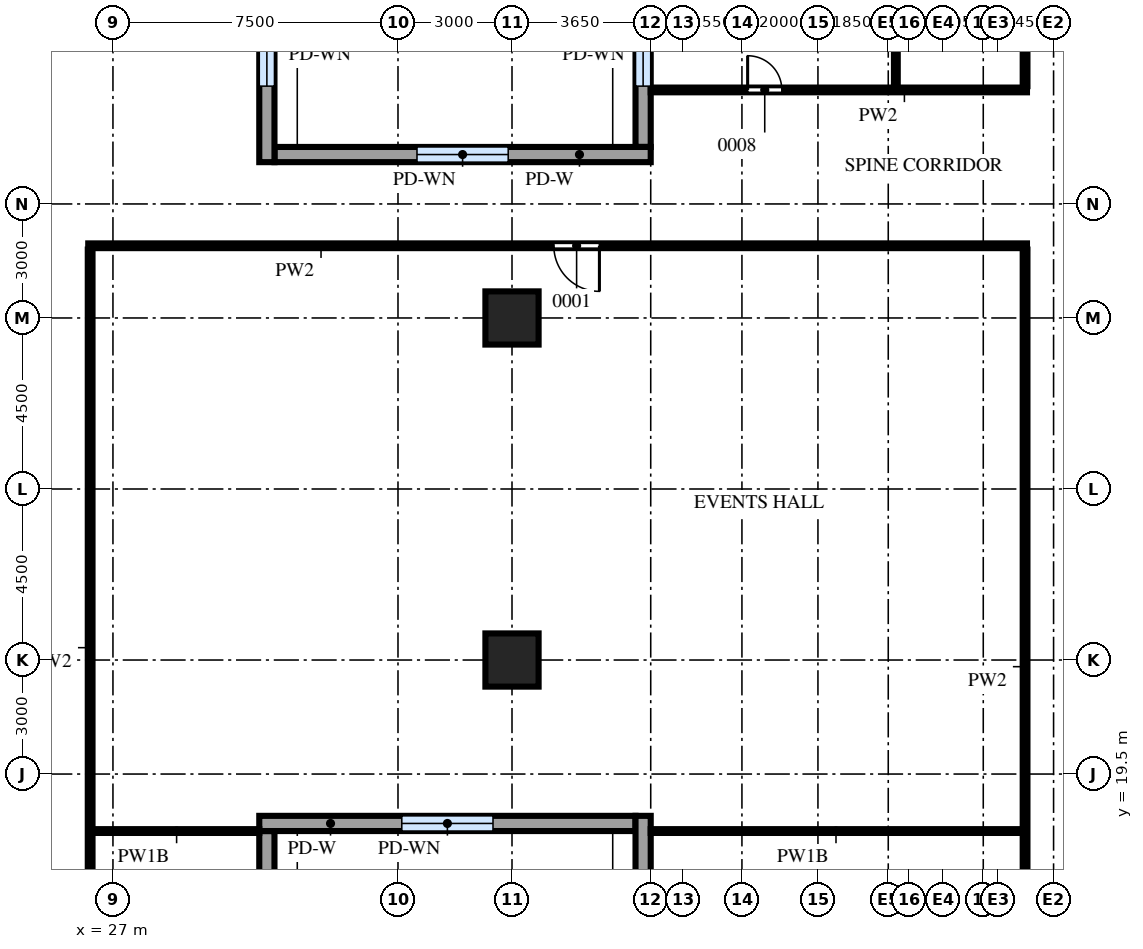
"""IFC4 building model, lengths in metres.
Left out: names, types, materials, properties, quantities, classifications, styles, units other than length and angle.
Written with IfcOpenShell. Run it as: python <this file> out.ifc"""

import sys

from ifc_helpers import new_model, si_unit, direction, frame, frame_2d, origin, origin_2d, place, context, subcontext, project, spatial, rectangle, extrude, source, transform, mapped, element, fill, save


model = new_model("IFC4")
c1 = context("Model", 3, precision=1e-05, world=origin(), true_north=direction((0.0, 1.0)))
c2 = subcontext(c1, "Body", "Model", "MODEL_VIEW")
j1 = project(units=[si_unit("LENGTHUNIT", "METRE"), si_unit("PLANEANGLEUNIT", "RADIAN")], contexts=[c1])
p1 = place(None, origin())
s1 = spatial("IfcSite", under=j1, at=p1, CompositionType="ELEMENT")
p2 = place(p1, origin())
s2 = spatial("IfcBuilding", under=s1, at=p2, CompositionType="ELEMENT")
p3 = place(p2, frame((0.0, 0.0, 23.5)))
s3 = spatial("IfcBuildingStorey", under=s2, at=p3, CompositionType="ELEMENT", Elevation=23.5)
m1 = source(origin(), c2, "Body", "SweptSolid", [
    extrude(rectangle(XDim=1.4, YDim=1.4, at=origin_2d()), origin(), (0.0, 0.0, 1.0), 4.7),
])
for number, where, z_axis, x_axis in (
    (1, (37.5, 22.5, 0.0), (0.0, 0.0, 1.0), (1.0, 0.0, 0.0)),
    (2, (37.5, 31.5, 0.0), (0.0, 0.0, 1.0), (1.0, 0.0, 0.0)),
):
    element("IfcColumn", number, at=place(p3, frame(where, z_axis=z_axis, x_axis=x_axis)), inside=s3, PredefinedType="COLUMN", context=c2, shape_type="MappedRepresentation", body=[
        mapped(m1, transform((0.0, 0.0, 0.0))),
    ])
m2 = source(origin(), c2, "Body", "SweptSolid", [
    extrude(rectangle(XDim=17.6, YDim=0.4, at=frame_2d((8.8, 0.0))), origin(), (0.0, 0.0, 1.0), 4.7),
])
p4 = place(p3, frame((31.05, 0.4, 0.0), z_axis=(0.0, 0.0, 1.0), x_axis=(0.0, 1.0, 0.0)))
e3 = element("IfcWall", 3, at=p4, inside=s3, PredefinedType="SOLIDWALL", context=c2, shape_type="MappedRepresentation", body=[
    mapped(m2, transform((0.0, 0.0, 0.0))),
])
m3 = source(origin(), c2, "Body", "SweptSolid", [
    extrude(rectangle(XDim=2.4, YDim=2.4, at=frame_2d((1.2, 1.2))), frame((0.0, 0.21, 0.0), z_axis=(0.0, -1.0, 0.0), x_axis=(1.0, 0.0, 0.0)), (0.0, 0.0, 1.0), 0.42),
])
p5 = place(p4, frame((1.6, 0.0, 1.0)))
e4 = element("IfcOpeningElement", 4, at=p5, cuts=e3, PredefinedType="OPENING", context=c2, shape_type="MappedRepresentation", body=[
    mapped(m3, transform((0.0, 0.0, 0.0))),
])
p6 = place(p4, frame((7.6, 0.0, 1.0)))
e5 = element("IfcOpeningElement", 5, at=p6, cuts=e3, PredefinedType="OPENING", context=c2, shape_type="MappedRepresentation", body=[
    mapped(m3, transform((0.0, 0.0, 0.0))),
])
p7 = place(p4, frame((13.6, 0.0, 1.0)))
e6 = element("IfcOpeningElement", 6, at=p7, cuts=e3, PredefinedType="OPENING", context=c2, shape_type="MappedRepresentation", body=[
    mapped(m3, transform((0.0, 0.0, 0.0))),
])
m4 = source(origin(), c2, "Body", "SweptSolid", [
    extrude(rectangle(XDim=9.9, YDim=0.4, at=frame_2d((4.95, 0.0))), origin(), (0.0, 0.0, 1.0), 4.7),
])
p8 = place(p3, frame((30.85, 18.2, 0.0), z_axis=(0.0, 0.0, 1.0), x_axis=(1.0, 0.0, 0.0)))
e7 = element("IfcWall", 7, at=p8, inside=s3, PredefinedType="SOLIDWALL", context=c2, shape_type="MappedRepresentation", body=[
    mapped(m4, transform((0.0, 0.0, 0.0))),
])
p9 = place(p8, frame((3.75, 0.0, 1.0)))
e8 = element("IfcOpeningElement", 8, at=p9, cuts=e7, PredefinedType="OPENING", context=c2, shape_type="MappedRepresentation", body=[
    mapped(m3, transform((0.0, 0.0, 0.0))),
])
m5 = source(origin(), c2, "Body", "SweptSolid", [
    extrude(rectangle(XDim=18.4, YDim=0.4, at=frame_2d((9.2, 0.0))), origin(), (0.0, 0.0, 1.0), 4.7),
])
p10 = place(p3, frame((40.95, 18.4, 0.0), z_axis=(0.0, 0.0, 1.0), x_axis=(0.0, -1.0, 0.0)))
e9 = element("IfcWall", 9, at=p10, inside=s3, PredefinedType="SOLIDWALL", context=c2, shape_type="MappedRepresentation", body=[
    mapped(m5, transform((0.0, 0.0, 0.0))),
])
p11 = place(p10, frame((2.0, 0.0, 1.0)))
e10 = element("IfcOpeningElement", 10, at=p11, cuts=e9, PredefinedType="OPENING", context=c2, shape_type="MappedRepresentation", body=[
    mapped(m3, transform((0.0, 0.0, 0.0))),
])
p12 = place(p10, frame((8.0, 0.0, 1.0)))
e11 = element("IfcOpeningElement", 11, at=p12, cuts=e9, PredefinedType="OPENING", context=c2, shape_type="MappedRepresentation", body=[
    mapped(m3, transform((0.0, 0.0, 0.0))),
])
p13 = place(p10, frame((14.0, 0.0, 1.0)))
e12 = element("IfcOpeningElement", 12, at=p13, cuts=e9, PredefinedType="OPENING", context=c2, shape_type="MappedRepresentation", body=[
    mapped(m3, transform((0.0, 0.0, 0.0))),
])
p14 = place(p3, frame((40.95, 53.6, 0.0), z_axis=(0.0, 0.0, 1.0), x_axis=(0.0, -1.0, 0.0)))
e13 = element("IfcWall", 13, at=p14, inside=s3, PredefinedType="SOLIDWALL", context=c2, shape_type="MappedRepresentation", body=[
    mapped(m2, transform((0.0, 0.0, 0.0))),
])
p15 = place(p14, frame((1.6, 0.0, 1.0)))
e14 = element("IfcOpeningElement", 14, at=p15, cuts=e13, PredefinedType="OPENING", context=c2, shape_type="MappedRepresentation", body=[
    mapped(m3, transform((0.0, 0.0, 0.0))),
])
p16 = place(p14, frame((7.6, 0.0, 1.0)))
e15 = element("IfcOpeningElement", 15, at=p16, cuts=e13, PredefinedType="OPENING", context=c2, shape_type="MappedRepresentation", body=[
    mapped(m3, transform((0.0, 0.0, 0.0))),
])
p17 = place(p14, frame((13.6, 0.0, 1.0)))
e16 = element("IfcOpeningElement", 16, at=p17, cuts=e13, PredefinedType="OPENING", context=c2, shape_type="MappedRepresentation", body=[
    mapped(m3, transform((0.0, 0.0, 0.0))),
])
p18 = place(p3, frame((41.15, 35.8, 0.0), z_axis=(0.0, 0.0, 1.0), x_axis=(-1.0, 0.0, 0.0)))
e17 = element("IfcWall", 17, at=p18, inside=s3, PredefinedType="SOLIDWALL", context=c2, shape_type="MappedRepresentation", body=[
    mapped(m4, transform((0.0, 0.0, 0.0))),
])
p19 = place(p18, frame((3.75, 0.0, 1.0)))
e18 = element("IfcOpeningElement", 18, at=p19, cuts=e17, PredefinedType="OPENING", context=c2, shape_type="MappedRepresentation", body=[
    mapped(m3, transform((0.0, 0.0, 0.0))),
])
p20 = place(p3, frame((31.05, 35.6, 0.0), z_axis=(0.0, 0.0, 1.0), x_axis=(0.0, 1.0, 0.0)))
e19 = element("IfcWall", 19, at=p20, inside=s3, PredefinedType="SOLIDWALL", context=c2, shape_type="MappedRepresentation", body=[
    mapped(m5, transform((0.0, 0.0, 0.0))),
])
p21 = place(p20, frame((2.0, 0.0, 1.0)))
e20 = element("IfcOpeningElement", 20, at=p21, cuts=e19, PredefinedType="OPENING", context=c2, shape_type="MappedRepresentation", body=[
    mapped(m3, transform((0.0, 0.0, 0.0))),
])
p22 = place(p20, frame((8.0, 0.0, 1.0)))
e21 = element("IfcOpeningElement", 21, at=p22, cuts=e19, PredefinedType="OPENING", context=c2, shape_type="MappedRepresentation", body=[
    mapped(m3, transform((0.0, 0.0, 0.0))),
])
p23 = place(p20, frame((14.0, 0.0, 1.0)))
e22 = element("IfcOpeningElement", 22, at=p23, cuts=e19, PredefinedType="OPENING", context=c2, shape_type="MappedRepresentation", body=[
    mapped(m3, transform((0.0, 0.0, 0.0))),
])
m6 = source(origin(), c2, "Body", "SweptSolid", [
    extrude(rectangle(XDim=29.7, YDim=0.125, at=frame_2d((14.85, 0.0))), origin(), (0.0, 0.0, 1.0), 4.7),
])
p24 = place(p3, frame((51.0, 3.6, 0.0), z_axis=(0.0, 0.0, 1.0), x_axis=(0.0, 1.0, 0.0)))
e23 = element("IfcWall", 23, at=p24, inside=s3, PredefinedType="PARTITIONING", context=c2, shape_type="MappedRepresentation", body=[
    mapped(m6, transform((0.0, 0.0, 0.0))),
])
m7 = source(origin(), c2, "Body", "SweptSolid", [
    extrude(rectangle(XDim=1.2, YDim=2.1, at=frame_2d((0.6, 1.05))), frame((0.0, 0.073, 0.0), z_axis=(0.0, -1.0, 0.0), x_axis=(1.0, 0.0, 0.0)), (0.0, 0.0, 1.0), 0.145),
])
p25 = place(p24, frame((6.55, 0.0, 0.0)))
e24 = element("IfcOpeningElement", 24, at=p25, cuts=e23, PredefinedType="OPENING", context=c2, shape_type="MappedRepresentation", body=[
    mapped(m7, transform((0.0, 0.0, 0.0))),
])
m8 = source(origin(), c2, "Body", "SweptSolid", [
    extrude(rectangle(XDim=27.15, YDim=0.125, at=frame_2d((13.575, 0.0))), origin(), (0.0, 0.0, 1.0), 4.7),
])
p26 = place(p3, frame((26.4, 6.15, 0.0), z_axis=(0.0, 0.0, 1.0), x_axis=(0.0, 1.0, 0.0)))
e25 = element("IfcWall", 25, at=p26, inside=s3, PredefinedType="PARTITIONING", context=c2, shape_type="MappedRepresentation", body=[
    mapped(m8, transform((0.0, 0.0, 0.0))),
])
m9 = source(origin(), c2, "Body", "SweptSolid", [
    extrude(rectangle(XDim=0.9, YDim=2.1, at=frame_2d((0.45, 1.05))), frame((0.0, 0.073, 0.0), z_axis=(0.0, -1.0, 0.0), x_axis=(1.0, 0.0, 0.0)), (0.0, 0.0, 1.0), 0.145),
])
p27 = place(p26, frame((5.3, 0.0, 0.0)))
e26 = element("IfcOpeningElement", 26, at=p27, cuts=e25, PredefinedType="OPENING", context=c2, shape_type="MappedRepresentation", body=[
    mapped(m9, transform((0.0, 0.0, 0.0))),
])
m10 = source(origin(), c2, "Body", "SweptSolid", [
    extrude(rectangle(XDim=4.35, YDim=0.1, at=frame_2d((2.175, 0.0))), origin(), (0.0, 0.0, 1.0), 4.7),
])
p28 = place(p3, frame((26.5, 18.0, 0.0), z_axis=(0.0, 0.0, 1.0), x_axis=(1.0, 0.0, 0.0)))
e27 = element("IfcWall", 27, at=p28, inside=s3, PredefinedType="PARTITIONING", context=c2, shape_type="MappedRepresentation", body=[
    mapped(m10, transform((0.0, 0.0, 0.0))),
])
m11 = source(origin(), c2, "Body", "SweptSolid", [
    extrude(rectangle(XDim=9.75, YDim=0.1, at=frame_2d((4.875, 0.0))), origin(), (0.0, 0.0, 1.0), 4.7),
])
p29 = place(p3, frame((41.15, 18.0, 0.0), z_axis=(0.0, 0.0, 1.0), x_axis=(1.0, 0.0, 0.0)))
e28 = element("IfcWall", 28, at=p29, inside=s3, PredefinedType="PARTITIONING", context=c2, shape_type="MappedRepresentation", body=[
    mapped(m11, transform((0.0, 0.0, 0.0))),
])
m12 = source(origin(), c2, "Body", "SweptSolid", [
    extrude(rectangle(XDim=24.7, YDim=0.125, at=frame_2d((12.35, 0.0))), origin(), (0.0, 0.0, 1.0), 4.7),
])
p30 = place(p3, frame((26.35, 33.4, 0.0), z_axis=(0.0, 0.0, 1.0), x_axis=(1.0, 0.0, 0.0)))
e29 = element("IfcWall", 29, at=p30, inside=s3, PredefinedType="PARTITIONING", context=c2, shape_type="MappedRepresentation", body=[
    mapped(m12, transform((0.0, 0.0, 0.0))),
])
p31 = place(p30, frame((12.25, 0.0, 0.0)))
e30 = element("IfcOpeningElement", 30, at=p31, cuts=e29, PredefinedType="OPENING", context=c2, shape_type="MappedRepresentation", body=[
    mapped(m7, transform((0.0, 0.0, 0.0))),
])
m13 = source(origin(), c2, "Body", "SweptSolid", [
    extrude(rectangle(XDim=9.9, YDim=0.125, at=frame_2d((4.95, 0.0))), origin(), (0.0, 0.0, 1.0), 4.7),
])
p32 = place(p3, frame((41.15, 37.5, 0.0), z_axis=(0.0, 0.0, 1.0), x_axis=(1.0, 0.0, 0.0)))
e31 = element("IfcWall", 31, at=p32, inside=s3, PredefinedType="PARTITIONING", context=c2, shape_type="MappedRepresentation", body=[
    mapped(m13, transform((0.0, 0.0, 0.0))),
])
p33 = place(p32, frame((2.55, 0.0, 0.0)))
e32 = element("IfcOpeningElement", 32, at=p33, cuts=e31, PredefinedType="OPENING", context=c2, shape_type="MappedRepresentation", body=[
    mapped(m9, transform((0.0, 0.0, 0.0))),
])
m14 = source(origin(), c2, "Body", "SweptSolid", [
    extrude(rectangle(XDim=16.0, YDim=0.1, at=frame_2d((8.0, 0.0))), origin(), (0.0, 0.0, 1.0), 4.7),
])
p34 = place(p3, frame((47.6, 37.6, 0.0), z_axis=(0.0, 0.0, 1.0), x_axis=(0.0, 1.0, 0.0)))
e33 = element("IfcWall", 33, at=p34, inside=s3, PredefinedType="PARTITIONING", context=c2, shape_type="MappedRepresentation", body=[
    mapped(m14, transform((0.0, 0.0, 0.0))),
])
m15 = source(origin(), c2, "Body", "SweptSolid", [
    extrude(rectangle(XDim=12.9, YDim=0.125, at=frame_2d((6.45, 0.0))), origin(), (0.0, 0.0, 1.0), 4.7),
])
p35 = place(p3, frame((51.0, 37.6, 0.0), z_axis=(0.0, 0.0, 1.0), x_axis=(0.0, 1.0, 0.0)))
e34 = element("IfcWall", 34, at=p35, inside=s3, PredefinedType="PARTITIONING", context=c2, shape_type="MappedRepresentation", body=[
    mapped(m15, transform((0.0, 0.0, 0.0))),
])
p36 = place(p35, frame((5.85, 0.0, 0.0)))
e35 = element("IfcOpeningElement", 35, at=p36, cuts=e34, PredefinedType="OPENING", context=c2, shape_type="MappedRepresentation", body=[
    mapped(m9, transform((0.0, 0.0, 0.0))),
])
m16 = source(origin(), c2, "Body", "SweptSolid", [
    extrude(rectangle(XDim=2.4, YDim=2.4, at=frame_2d((1.2, 1.2))), frame((0.0, 0.03, 0.0), z_axis=(0.0, -1.0, 0.0), x_axis=(1.0, 0.0, 0.0)), (0.0, 0.0, 1.0), 0.06),
])
p37 = place(p9, origin())
e36 = element("IfcWindow", 36, at=p37, inside=s3, PartitioningType="SINGLE_PANEL", PredefinedType="WINDOW", context=c2, shape_type="MappedRepresentation", body=[
    mapped(m16, transform((0.0, 0.0, 0.0))),
])
fill(e8, e36)
p38 = place(p17, origin())
e37 = element("IfcWindow", 37, at=p38, inside=s3, PartitioningType="SINGLE_PANEL", PredefinedType="WINDOW", context=c2, shape_type="MappedRepresentation", body=[
    mapped(m16, transform((0.0, 0.0, 0.0))),
])
fill(e16, e37)
p39 = place(p19, origin())
e38 = element("IfcWindow", 38, at=p39, inside=s3, PartitioningType="SINGLE_PANEL", PredefinedType="WINDOW", context=c2, shape_type="MappedRepresentation", body=[
    mapped(m16, transform((0.0, 0.0, 0.0))),
])
fill(e18, e38)
p40 = place(p21, origin())
e39 = element("IfcWindow", 39, at=p40, inside=s3, PartitioningType="SINGLE_PANEL", PredefinedType="WINDOW", context=c2, shape_type="MappedRepresentation", body=[
    mapped(m16, transform((0.0, 0.0, 0.0))),
])
fill(e20, e39)
m17 = source(origin(), c2, "Body", "SweptSolid", [
    extrude(rectangle(XDim=1.2, YDim=2.1, at=frame_2d((0.6, 1.05))), frame((0.0, 0.025, 0.0), z_axis=(0.0, -1.0, 0.0), x_axis=(1.0, 0.0, 0.0)), (0.0, 0.0, 1.0), 0.05),
])
p41 = place(p31, origin())
e40 = element("IfcDoor", 40, at=p41, inside=s3, OperationType="SINGLE_SWING_RIGHT", PredefinedType="DOOR", context=c2, shape_type="MappedRepresentation", body=[
    mapped(m17, transform((0.0, 0.0, 0.0))),
])
fill(e30, e40)
m18 = source(origin(), c2, "Body", "SweptSolid", [
    extrude(rectangle(XDim=0.9, YDim=2.1, at=frame_2d((0.45, 1.05))), frame((0.0, 0.025, 0.0), z_axis=(0.0, -1.0, 0.0), x_axis=(1.0, 0.0, 0.0)), (0.0, 0.0, 1.0), 0.05),
])
p42 = place(p33, origin())
e41 = element("IfcDoor", 41, at=p42, inside=s3, OperationType="SINGLE_SWING_RIGHT", PredefinedType="DOOR", context=c2, shape_type="MappedRepresentation", body=[
    mapped(m18, transform((0.0, 0.0, 0.0))),
])
fill(e32, e41)
save(model, sys.argv[1])
